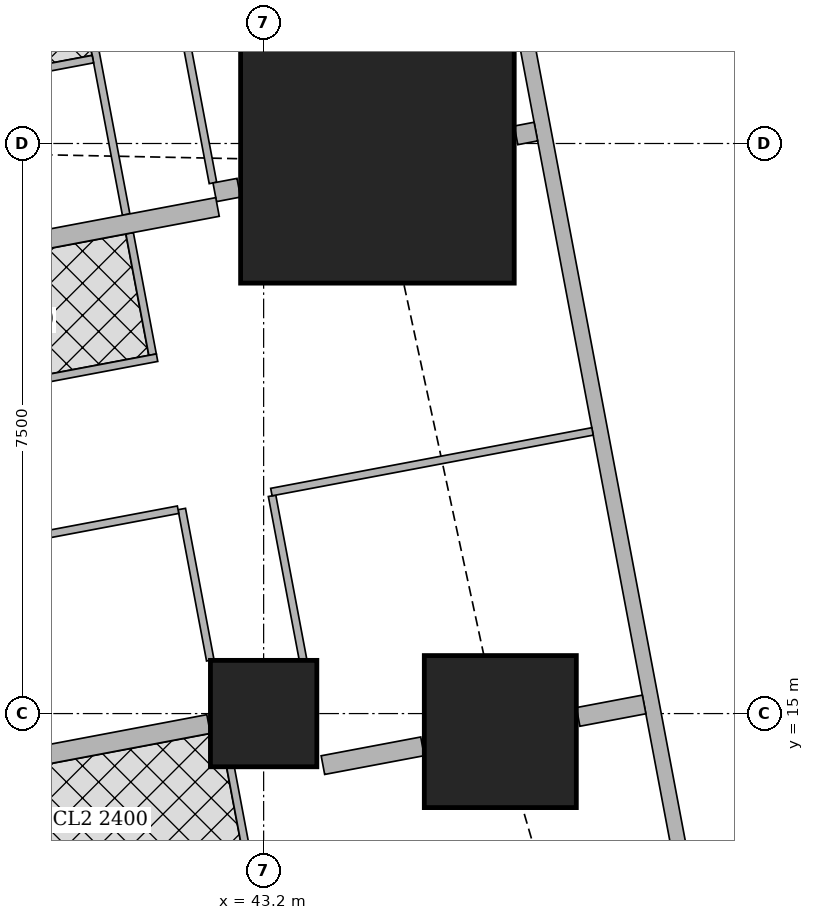
"""IFC4 building model, lengths in metres.
Left out: names, types, materials, properties, quantities, classifications, styles, units other than length and angle.
Written with IfcOpenShell. Run it as: python <this file> out.ifc"""

import sys

from ifc_helpers import new_model, si_unit, direction, frame, frame_2d, origin, origin_2d, place, context, subcontext, project, spatial, rectangle, extrude, element, fill, save


model = new_model("IFC4")
c1 = context("Model", 3, precision=1e-05, world=origin(), true_north=direction((0.0, 1.0)))
c2 = subcontext(c1, "Body", "Model", "MODEL_VIEW")
j1 = project(units=[si_unit("LENGTHUNIT", "METRE"), si_unit("PLANEANGLEUNIT", "RADIAN")], contexts=[c1])
p1 = place(None, origin())
s1 = spatial("IfcSite", under=j1, at=p1, CompositionType="ELEMENT")
p2 = place(p1, origin())
s2 = spatial("IfcBuilding", under=s1, at=p2, CompositionType="ELEMENT")
p3 = place(p2, frame((0.0, 0.0, 251.6)))
s3 = spatial("IfcBuildingStorey", under=s2, at=p3, CompositionType="ELEMENT", Elevation=251.6)
p4 = place(p3, frame((43.2, 15.0, 0.0), z_axis=(0.0, 0.0, 1.0), x_axis=(1.0, 0.0, 0.0)))
e1 = element("IfcColumn", 1, at=p4, inside=s3, PredefinedType="COLUMN", context=c2, shape_type="SweptSolid", body=[
    extrude(rectangle(XDim=1.4, YDim=1.4, at=origin_2d()), origin(), (0.0, 0.0, 1.0), 3.75),
])
p5 = place(p3, frame((46.314, 14.763, 0.0), z_axis=(0.0, 0.0, 1.0), x_axis=(1.0, 0.0, 0.0)))
e2 = element("IfcColumn", 2, at=p5, inside=s3, PredefinedType="COLUMN", context=c2, shape_type="SweptSolid", body=[
    extrude(rectangle(XDim=2.0, YDim=2.0, at=origin_2d()), origin(), (0.0, 0.0, 1.0), 3.75),
])
p6 = place(p3, frame((44.697, 22.263, 0.0), z_axis=(0.0, 0.0, 1.0), x_axis=(1.0, 0.0, 0.0)))
e3 = element("IfcColumn", 3, at=p6, inside=s3, PredefinedType="COLUMN", context=c2, shape_type="SweptSolid", body=[
    extrude(rectangle(XDim=3.6, YDim=3.2, at=origin_2d()), origin(), (0.0, 0.0, 1.0), 3.75),
])
p7 = place(p3, frame((49.684, 7.832, 0.0), z_axis=(0.0, 0.0, 1.0), x_axis=(-0.185616669694, 0.982622232565, 0.0)))
e4 = element("IfcWall", 4, at=p7, inside=s3, PredefinedType="SOLIDWALL", context=c2, shape_type="SweptSolid", body=[
    extrude(rectangle(XDim=36.0, YDim=0.2, at=frame_2d((18.0, 0.0))), origin(), (0.0, 0.0, 1.0), 3.5),
])
p8 = place(p7, frame((2.518, 0.0, 0.9)))
e5 = element("IfcOpeningElement", 5, at=p8, cuts=e4, PredefinedType="OPENING", context=c2, shape_type="SweptSolid", body=[
    extrude(rectangle(XDim=2.4, YDim=1.5, at=frame_2d((1.2, 0.75))), frame((0.0, 0.11, 0.0), z_axis=(0.0, -1.0, 0.0), x_axis=(1.0, 0.0, 0.0)), (0.0, 0.0, 1.0), 0.22),
])
p9 = place(p7, frame((8.444, 0.0, 0.9)))
e6 = element("IfcOpeningElement", 6, at=p9, cuts=e4, PredefinedType="OPENING", context=c2, shape_type="SweptSolid", body=[
    extrude(rectangle(XDim=1.8, YDim=1.5, at=frame_2d((0.9, 0.75))), frame((0.0, 0.11, 0.0), z_axis=(0.0, -1.0, 0.0), x_axis=(1.0, 0.0, 0.0)), (0.0, 0.0, 1.0), 0.22),
])
p10 = place(p7, frame((12.261, 0.0, 0.9)))
e7 = element("IfcOpeningElement", 7, at=p10, cuts=e4, PredefinedType="OPENING", context=c2, shape_type="SweptSolid", body=[
    extrude(rectangle(XDim=1.8, YDim=1.5, at=frame_2d((0.9, 0.75))), frame((0.0, 0.11, 0.0), z_axis=(0.0, -1.0, 0.0), x_axis=(1.0, 0.0, 0.0)), (0.0, 0.0, 1.0), 0.22),
])
p11 = place(p7, frame((16.078, 0.0, 0.9)))
e8 = element("IfcOpeningElement", 8, at=p11, cuts=e4, PredefinedType="OPENING", context=c2, shape_type="SweptSolid", body=[
    extrude(rectangle(XDim=1.8, YDim=1.5, at=frame_2d((0.9, 0.75))), frame((0.0, 0.11, 0.0), z_axis=(0.0, -1.0, 0.0), x_axis=(1.0, 0.0, 0.0)), (0.0, 0.0, 1.0), 0.22),
])
p12 = place(p7, frame((19.894, 0.0, 0.9)))
e9 = element("IfcOpeningElement", 9, at=p12, cuts=e4, PredefinedType="OPENING", context=c2, shape_type="SweptSolid", body=[
    extrude(rectangle(XDim=1.8, YDim=1.5, at=frame_2d((0.9, 0.75))), frame((0.0, 0.11, 0.0), z_axis=(0.0, -1.0, 0.0), x_axis=(1.0, 0.0, 0.0)), (0.0, 0.0, 1.0), 0.22),
])
p13 = place(p7, frame((23.71, 0.0, 0.9)))
e10 = element("IfcOpeningElement", 10, at=p13, cuts=e4, PredefinedType="OPENING", context=c2, shape_type="SweptSolid", body=[
    extrude(rectangle(XDim=1.8, YDim=1.5, at=frame_2d((0.9, 0.75))), frame((0.0, 0.11, 0.0), z_axis=(0.0, -1.0, 0.0), x_axis=(1.0, 0.0, 0.0)), (0.0, 0.0, 1.0), 0.22),
])
p14 = place(p7, frame((27.526, 0.0, 0.9)))
e11 = element("IfcOpeningElement", 11, at=p14, cuts=e4, PredefinedType="OPENING", context=c2, shape_type="SweptSolid", body=[
    extrude(rectangle(XDim=1.8, YDim=1.5, at=frame_2d((0.9, 0.75))), frame((0.0, 0.11, 0.0), z_axis=(0.0, -1.0, 0.0), x_axis=(1.0, 0.0, 0.0)), (0.0, 0.0, 1.0), 0.22),
])
p15 = place(p7, frame((32.046, 0.0, 0.9)))
e12 = element("IfcOpeningElement", 12, at=p15, cuts=e4, PredefinedType="OPENING", context=c2, shape_type="SweptSolid", body=[
    extrude(rectangle(XDim=1.8, YDim=1.5, at=frame_2d((0.9, 0.75))), frame((0.0, 0.11, 0.0), z_axis=(0.0, -1.0, 0.0), x_axis=(1.0, 0.0, 0.0)), (0.0, 0.0, 1.0), 0.22),
])
p16 = place(p3, frame((33.781, 42.186, 0.0), z_axis=(0.0, 0.0, 1.0), x_axis=(0.185593518645, -0.9826266055, 0.0)))
e13 = element("IfcWall", 13, at=p16, inside=s3, PredefinedType="SOLIDWALL", context=c2, shape_type="SweptSolid", body=[
    extrude(rectangle(XDim=35.961, YDim=0.15, at=frame_2d((17.98, 0.0))), origin(), (0.0, 0.0, 1.0), 2.5),
])
p17 = place(p16, frame((7.183, 0.0, 0.0)))
e14 = element("IfcOpeningElement", 14, at=p17, cuts=e13, PredefinedType="OPENING", context=c2, shape_type="SweptSolid", body=[
    extrude(rectangle(XDim=1.0, YDim=2.1, at=frame_2d((0.5, 1.05))), frame((0.0, 0.085, 0.0), z_axis=(0.0, -1.0, 0.0), x_axis=(1.0, 0.0, 0.0)), (0.0, 0.0, 1.0), 0.17),
])
p18 = place(p16, frame((11.76, 0.0, 0.0)))
e15 = element("IfcOpeningElement", 15, at=p18, cuts=e13, PredefinedType="OPENING", context=c2, shape_type="SweptSolid", body=[
    extrude(rectangle(XDim=1.0, YDim=2.1, at=frame_2d((0.5, 1.05))), frame((0.0, 0.085, 0.0), z_axis=(0.0, -1.0, 0.0), x_axis=(1.0, 0.0, 0.0)), (0.0, 0.0, 1.0), 0.17),
])
p19 = place(p16, frame((23.863, 0.0, 0.0)))
e16 = element("IfcOpeningElement", 16, at=p19, cuts=e13, PredefinedType="OPENING", context=c2, shape_type="SweptSolid", body=[
    extrude(rectangle(XDim=1.0, YDim=2.1, at=frame_2d((0.5, 1.05))), frame((0.0, 0.085, 0.0), z_axis=(0.0, -1.0, 0.0), x_axis=(1.0, 0.0, 0.0)), (0.0, 0.0, 1.0), 0.17),
])
p20 = place(p16, frame((30.502, 0.0, 0.0)))
e17 = element("IfcOpeningElement", 17, at=p20, cuts=e13, PredefinedType="OPENING", context=c2, shape_type="SweptSolid", body=[
    extrude(rectangle(XDim=1.0, YDim=2.1, at=frame_2d((0.5, 1.05))), frame((0.0, 0.085, 0.0), z_axis=(0.0, -1.0, 0.0), x_axis=(1.0, 0.0, 0.0)), (0.0, 0.0, 1.0), 0.17),
])
p21 = place(p3, frame((41.157, 29.273, 0.0), z_axis=(0.0, 0.0, 1.0), x_axis=(0.18542464283, -0.982658486877, 0.0)))
e18 = element("IfcWall", 18, at=p21, inside=s3, PredefinedType="PARTITIONING", context=c2, shape_type="SweptSolid", body=[
    extrude(rectangle(XDim=7.421, YDim=0.1, at=frame_2d((3.71, 0.0))), origin(), (0.0, 0.0, 1.0), 2.5),
])
p22 = place(p21, frame((0.8, 0.0, 0.0)))
e19 = element("IfcOpeningElement", 19, at=p22, cuts=e18, PredefinedType="OPENING", context=c2, shape_type="SweptSolid", body=[
    extrude(rectangle(XDim=0.9, YDim=2.1, at=frame_2d((0.45, 1.05))), frame((0.0, 0.06, 0.0), z_axis=(0.0, -1.0, 0.0), x_axis=(1.0, 0.0, 0.0)), (0.0, 0.0, 1.0), 0.12),
])
p23 = place(p21, frame((4.126, 0.0, 0.0)))
e20 = element("IfcOpeningElement", 20, at=p23, cuts=e18, PredefinedType="OPENING", context=c2, shape_type="SweptSolid", body=[
    extrude(rectangle(XDim=0.9, YDim=2.1, at=frame_2d((0.45, 1.05))), frame((0.0, 0.06, 0.0), z_axis=(0.0, -1.0, 0.0), x_axis=(1.0, 0.0, 0.0)), (0.0, 0.0, 1.0), 0.12),
])
p24 = place(p3, frame((39.997, 28.942, 0.0), z_axis=(0.0, 0.0, 1.0), x_axis=(0.185686318797, -0.982609073341, 0.0)))
e21 = element("IfcWall", 21, at=p24, inside=s3, PredefinedType="PARTITIONING", context=c2, shape_type="SweptSolid", body=[
    extrude(rectangle(XDim=7.508, YDim=0.1, at=frame_2d((3.754, 0.0))), origin(), (0.0, 0.0, 1.0), 2.5),
])
p25 = place(p24, frame((0.576, 0.0, 0.0)))
e22 = element("IfcOpeningElement", 22, at=p25, cuts=e21, PredefinedType="OPENING", context=c2, shape_type="SweptSolid", body=[
    extrude(rectangle(XDim=0.9, YDim=2.1, at=frame_2d((0.45, 1.05))), frame((0.0, 0.06, 0.0), z_axis=(0.0, -1.0, 0.0), x_axis=(1.0, 0.0, 0.0)), (0.0, 0.0, 1.0), 0.12),
])
p26 = place(p24, frame((4.166, 0.0, 0.0)))
e23 = element("IfcOpeningElement", 23, at=p26, cuts=e21, PredefinedType="OPENING", context=c2, shape_type="SweptSolid", body=[
    extrude(rectangle(XDim=0.9, YDim=2.1, at=frame_2d((0.45, 1.05))), frame((0.0, 0.06, 0.0), z_axis=(0.0, -1.0, 0.0), x_axis=(1.0, 0.0, 0.0)), (0.0, 0.0, 1.0), 0.12),
])
p27 = place(p24, frame((2.483, 0.0, 0.0)))
e24 = element("IfcOpeningElement", 24, at=p27, cuts=e21, PredefinedType="OPENING", context=c2, shape_type="SweptSolid", body=[
    extrude(rectangle(XDim=0.9, YDim=2.1, at=frame_2d((0.45, 1.05))), frame((0.0, 0.06, 0.0), z_axis=(0.0, -1.0, 0.0), x_axis=(1.0, 0.0, 0.0)), (0.0, 0.0, 1.0), 0.12),
])
p28 = place(p24, frame((6.074, 0.0, 0.0)))
e25 = element("IfcOpeningElement", 25, at=p28, cuts=e21, PredefinedType="OPENING", context=c2, shape_type="SweptSolid", body=[
    extrude(rectangle(XDim=0.9, YDim=2.1, at=frame_2d((0.45, 1.05))), frame((0.0, 0.06, 0.0), z_axis=(0.0, -1.0, 0.0), x_axis=(1.0, 0.0, 0.0)), (0.0, 0.0, 1.0), 0.12),
])
p29 = place(p3, frame((40.954, 23.61, 0.0), z_axis=(0.0, 0.0, 1.0), x_axis=(-0.98264808502, -0.18547975902, 0.0)))
e26 = element("IfcWall", 26, at=p29, inside=s3, PredefinedType="PARTITIONING", context=c2, shape_type="SweptSolid", body=[
    extrude(rectangle(XDim=3.526, YDim=0.1, at=frame_2d((1.763, 0.0))), origin(), (0.0, 0.0, 1.0), 2.5),
])
p30 = place(p3, frame((41.437, 21.319, 0.0), z_axis=(0.0, 0.0, 1.0), x_axis=(0.185793689589, -0.982588777113, 0.0)))
e27 = element("IfcWall", 27, at=p30, inside=s3, PredefinedType="PARTITIONING", context=c2, shape_type="SweptSolid", body=[
    extrude(rectangle(XDim=1.625, YDim=0.1, at=frame_2d((0.813, 0.0))), origin(), (0.0, 0.0, 1.0), 3.5),
])
p31 = place(p30, frame((0.325, 0.0, 0.0)))
e28 = element("IfcOpeningElement", 28, at=p31, cuts=e27, PredefinedType="OPENING", context=c2, shape_type="SweptSolid", body=[
    extrude(rectangle(XDim=0.9, YDim=2.1, at=frame_2d((0.45, 1.05))), frame((0.0, 0.06, 0.0), z_axis=(0.0, -1.0, 0.0), x_axis=(1.0, 0.0, 0.0)), (0.0, 0.0, 1.0), 0.12),
])
p32 = place(p3, frame((41.798, 19.682, 0.0), z_axis=(0.0, 0.0, 1.0), x_axis=(-0.982681091817, -0.185304807776, 0.0)))
e29 = element("IfcWall", 29, at=p32, inside=s3, PredefinedType="PARTITIONING", context=c2, shape_type="SweptSolid", body=[
    extrude(rectangle(XDim=3.626, YDim=0.1, at=frame_2d((1.813, 0.0))), origin(), (0.0, 0.0, 1.0), 3.5),
])
p33 = place(p3, frame((43.311, 17.865, 0.0), z_axis=(0.0, 0.0, 1.0), x_axis=(0.185572140257, -0.982630643101, 0.0)))
e30 = element("IfcWall", 30, at=p33, inside=s3, PredefinedType="PARTITIONING", context=c2, shape_type="SweptSolid", body=[
    extrude(rectangle(XDim=2.193, YDim=0.1, at=frame_2d((1.097, 0.0))), origin(), (0.0, 0.0, 1.0), 3.5),
])
p34 = place(p33, frame((0.15, 0.0, 0.0)))
e31 = element("IfcOpeningElement", 31, at=p34, cuts=e30, PredefinedType="OPENING", context=c2, shape_type="SweptSolid", body=[
    extrude(rectangle(XDim=0.9, YDim=2.1, at=frame_2d((0.45, 1.05))), frame((0.0, 0.06, 0.0), z_axis=(0.0, -1.0, 0.0), x_axis=(1.0, 0.0, 0.0)), (0.0, 0.0, 1.0), 0.12),
])
p35 = place(p3, frame((42.123, 17.691, 0.0), z_axis=(0.0, 0.0, 1.0), x_axis=(0.185183804812, -0.98270390171, 0.0)))
e32 = element("IfcWall", 32, at=p35, inside=s3, PredefinedType="PARTITIONING", context=c2, shape_type="SweptSolid", body=[
    extrude(rectangle(XDim=2.025, YDim=0.1, at=frame_2d((1.012, 0.0))), origin(), (0.0, 0.0, 1.0), 3.5),
])
p36 = place(p3, frame((47.527, 18.712, 0.0), z_axis=(0.0, 0.0, 1.0), x_axis=(-0.982633535512, -0.185556823879, 0.0)))
e33 = element("IfcWall", 33, at=p36, inside=s3, PredefinedType="PARTITIONING", context=c2, shape_type="SweptSolid", body=[
    extrude(rectangle(XDim=4.3, YDim=0.1, at=frame_2d((2.15, 0.0))), origin(), (0.0, 0.0, 1.0), 2.5),
])
p37 = place(p3, frame((42.074, 17.682, 0.0), z_axis=(0.0, 0.0, 1.0), x_axis=(-0.982660701716, -0.185412904897, 0.0)))
e34 = element("IfcWall", 34, at=p37, inside=s3, PredefinedType="PARTITIONING", context=c2, shape_type="SweptSolid", body=[
    extrude(rectangle(XDim=3.526, YDim=0.1, at=frame_2d((1.763, 0.0))), origin(), (0.0, 0.0, 1.0), 3.5),
])
p38 = place(p37, frame((1.326, 0.0, 0.0)))
e35 = element("IfcOpeningElement", 35, at=p38, cuts=e34, PredefinedType="OPENING", context=c2, shape_type="SweptSolid", body=[
    extrude(rectangle(XDim=0.9, YDim=2.1, at=frame_2d((0.45, 1.05))), frame((0.0, 0.06, 0.0), z_axis=(0.0, -1.0, 0.0), x_axis=(1.0, 0.0, 0.0)), (0.0, 0.0, 1.0), 0.12),
])
p39 = place(p3, frame((46.782, 22.657, 0.0), z_axis=(0.0, 0.0, 1.0), x_axis=(-0.982104607121, -0.188336243648, 0.0)))
e36 = element("IfcWall", 36, at=p39, inside=s3, PredefinedType="SOLIDWALL", context=c2, shape_type="SweptSolid", body=[
    extrude(rectangle(XDim=0.266, YDim=0.25, at=frame_2d((0.133, 0.0))), origin(), (0.0, 0.0, 1.0), 3.5),
])
p40 = place(p3, frame((42.873, 21.918, 0.0), z_axis=(0.0, 0.0, 1.0), x_axis=(-0.982431406936, -0.186624035603, 0.0)))
e37 = element("IfcWall", 37, at=p40, inside=s3, PredefinedType="SOLIDWALL", context=c2, shape_type="SweptSolid", body=[
    extrude(rectangle(XDim=0.322, YDim=0.25, at=frame_2d((0.161, 0.0))), origin(), (0.0, 0.0, 1.0), 2.5),
])
p41 = place(p3, frame((42.593, 21.665, 0.0), z_axis=(0.0, 0.0, 1.0), x_axis=(-0.982635807605, -0.185544791394, 0.0)))
e38 = element("IfcWall", 38, at=p41, inside=s3, PredefinedType="SOLIDWALL", context=c2, shape_type="SweptSolid", body=[
    extrude(rectangle(XDim=4.775, YDim=0.25, at=frame_2d((2.388, 0.0))), origin(), (0.0, 0.0, 1.0), 2.5),
])
p42 = place(p3, frame((42.765, 14.29, 0.0), z_axis=(0.0, 0.0, 1.0), x_axis=(0.185446293138, -0.982654401283, 0.0)))
e39 = element("IfcWall", 39, at=p42, inside=s3, PredefinedType="PARTITIONING", context=c2, shape_type="SweptSolid", body=[
    extrude(rectangle(XDim=1.273, YDim=0.1, at=frame_2d((0.636, 0.0))), origin(), (0.0, 0.0, 1.0), 3.5),
])
p43 = place(p3, frame((48.206, 15.12, 0.0), z_axis=(0.0, 0.0, 1.0), x_axis=(-0.982608419258, -0.185689780017, 0.0)))
e40 = element("IfcWall", 40, at=p43, inside=s3, PredefinedType="SOLIDWALL", context=c2, shape_type="SweptSolid", body=[
    extrude(rectangle(XDim=0.884, YDim=0.25, at=frame_2d((0.442, 0.0))), origin(), (0.0, 0.0, 1.0), 3.5),
])
p44 = place(p3, frame((45.29, 14.569, 0.0), z_axis=(0.0, 0.0, 1.0), x_axis=(-0.982676759201, -0.185327782391, 0.0)))
e41 = element("IfcWall", 41, at=p44, inside=s3, PredefinedType="SOLIDWALL", context=c2, shape_type="SweptSolid", body=[
    extrude(rectangle(XDim=1.333, YDim=0.25, at=frame_2d((0.667, 0.0))), origin(), (0.0, 0.0, 1.0), 3.5),
])
p45 = place(p3, frame((42.476, 14.863, 0.0), z_axis=(0.0, 0.0, 1.0), x_axis=(-0.982603567712, -0.185715450942, 0.0)))
e42 = element("IfcWall", 42, at=p45, inside=s3, PredefinedType="SOLIDWALL", context=c2, shape_type="SweptSolid", body=[
    extrude(rectangle(XDim=3.398, YDim=0.25, at=frame_2d((1.699, 0.0))), origin(), (0.0, 0.0, 1.0), 3.5),
])
p46 = place(p9, origin())
e43 = element("IfcWindow", 43, at=p46, inside=s3, PartitioningType="SINGLE_PANEL", PredefinedType="WINDOW", context=c2, shape_type="SweptSolid", body=[
    extrude(rectangle(XDim=1.8, YDim=1.5, at=frame_2d((0.9, 0.75))), frame((0.0, 0.03, 0.0), z_axis=(0.0, -1.0, 0.0), x_axis=(1.0, 0.0, 0.0)), (0.0, 0.0, 1.0), 0.06),
])
fill(e6, e43)
p47 = place(p10, origin())
e44 = element("IfcWindow", 44, at=p47, inside=s3, PartitioningType="SINGLE_PANEL", PredefinedType="WINDOW", context=c2, shape_type="SweptSolid", body=[
    extrude(rectangle(XDim=1.8, YDim=1.5, at=frame_2d((0.9, 0.75))), frame((0.0, 0.03, 0.0), z_axis=(0.0, -1.0, 0.0), x_axis=(1.0, 0.0, 0.0)), (0.0, 0.0, 1.0), 0.06),
])
fill(e7, e44)
p48 = place(p11, origin())
e45 = element("IfcWindow", 45, at=p48, inside=s3, PartitioningType="SINGLE_PANEL", PredefinedType="WINDOW", context=c2, shape_type="SweptSolid", body=[
    extrude(rectangle(XDim=1.8, YDim=1.5, at=frame_2d((0.9, 0.75))), frame((0.0, 0.03, 0.0), z_axis=(0.0, -1.0, 0.0), x_axis=(1.0, 0.0, 0.0)), (0.0, 0.0, 1.0), 0.06),
])
fill(e8, e45)
p49 = place(p28, origin())
e46 = element("IfcDoor", 46, at=p49, inside=s3, OperationType="SINGLE_SWING_LEFT", PredefinedType="DOOR", context=c2, shape_type="SweptSolid", body=[
    extrude(rectangle(XDim=0.9, YDim=2.1, at=frame_2d((0.45, 1.05))), frame((0.0, 0.025, 0.0), z_axis=(0.0, -1.0, 0.0), x_axis=(1.0, 0.0, 0.0)), (0.0, 0.0, 1.0), 0.05),
])
fill(e25, e46)
p50 = place(p31, origin())
e47 = element("IfcDoor", 47, at=p50, inside=s3, OperationType="SINGLE_SWING_RIGHT", PredefinedType="DOOR", context=c2, shape_type="SweptSolid", body=[
    extrude(rectangle(XDim=0.9, YDim=2.1, at=frame_2d((0.45, 1.05))), frame((0.0, 0.025, 0.0), z_axis=(0.0, -1.0, 0.0), x_axis=(1.0, 0.0, 0.0)), (0.0, 0.0, 1.0), 0.05),
])
fill(e28, e47)
p51 = place(p34, origin())
e48 = element("IfcDoor", 48, at=p51, inside=s3, OperationType="SINGLE_SWING_LEFT", PredefinedType="DOOR", context=c2, shape_type="SweptSolid", body=[
    extrude(rectangle(XDim=0.9, YDim=2.1, at=frame_2d((0.45, 1.05))), frame((0.0, 0.025, 0.0), z_axis=(0.0, -1.0, 0.0), x_axis=(1.0, 0.0, 0.0)), (0.0, 0.0, 1.0), 0.05),
])
fill(e31, e48)
p52 = place(p38, origin())
e49 = element("IfcDoor", 49, at=p52, inside=s3, OperationType="SINGLE_SWING_RIGHT", PredefinedType="DOOR", context=c2, shape_type="SweptSolid", body=[
    extrude(rectangle(XDim=0.9, YDim=2.1, at=frame_2d((0.45, 1.05))), frame((0.0, 0.025, 0.0), z_axis=(0.0, -1.0, 0.0), x_axis=(1.0, 0.0, 0.0)), (0.0, 0.0, 1.0), 0.05),
])
fill(e35, e49)
save(model, sys.argv[1])
